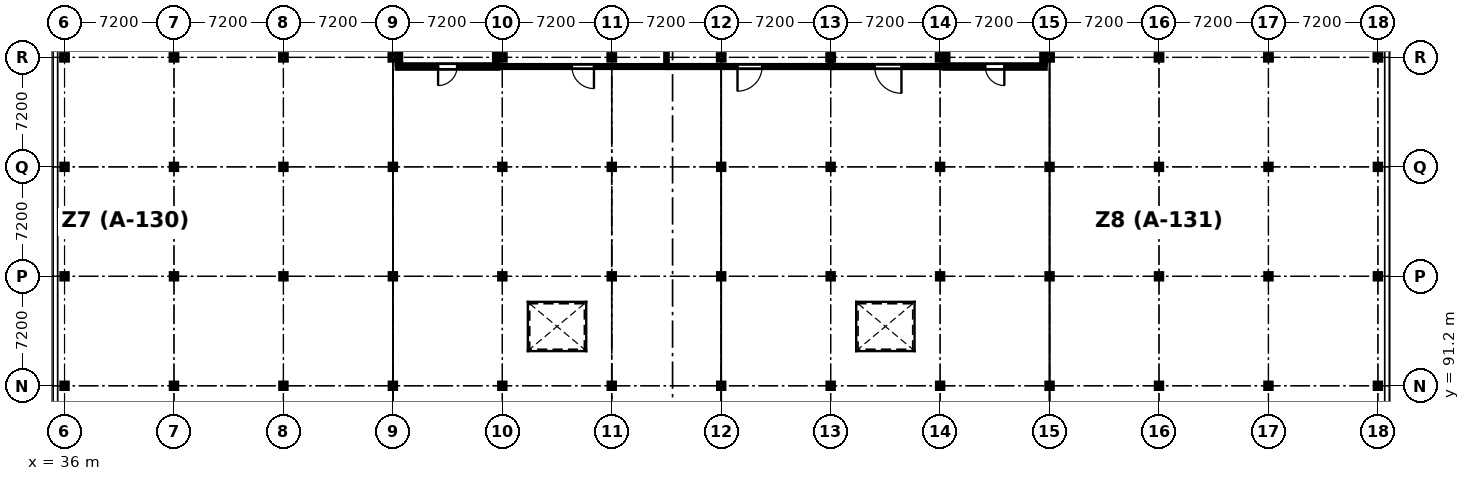
"""IFC4 building model, lengths in metres.
Left out: names, types, materials, properties, quantities, classifications, styles, units other than length and angle.
Written with IfcOpenShell. Run it as: python <this file> out.ifc"""

import sys

from ifc_helpers import new_model, si_unit, direction, frame, frame_2d, origin, origin_2d, place, context, subcontext, project, spatial, rectangle, i_section, extrude, element, fill, save


model = new_model("IFC4")
c1 = context("Model", 3, precision=1e-05, world=origin(), true_north=direction((0.0, 1.0)))
c2 = subcontext(c1, "Body", "Model", "MODEL_VIEW")
j1 = project(units=[si_unit("LENGTHUNIT", "METRE"), si_unit("PLANEANGLEUNIT", "RADIAN")], contexts=[c1])
p1 = place(None, origin())
s1 = spatial("IfcSite", under=j1, at=p1, CompositionType="ELEMENT")
p2 = place(p1, origin())
s2 = spatial("IfcBuilding", under=s1, at=p2, CompositionType="ELEMENT")
p3 = place(p2, frame((0.0, 0.0, 9.3)))
s3 = spatial("IfcBuildingStorey", under=s2, at=p3, CompositionType="ELEMENT", Elevation=9.3)
for number, where, z_axis, x_axis in (
    (1, (36.0, 91.2, 0.0), (0.0, 0.0, 1.0), (1.0, 0.0, 0.0)),
    (2, (36.0, 98.4, 0.0), (0.0, 0.0, 1.0), (1.0, 0.0, 0.0)),
    (3, (36.0, 105.6, 0.0), (0.0, 0.0, 1.0), (1.0, 0.0, 0.0)),
):
    element("IfcColumn", number, at=place(p3, frame(where, z_axis=z_axis, x_axis=x_axis)), inside=s3, PredefinedType="COLUMN", context=c2, shape_type="SweptSolid", body=[
        extrude(i_section(OverallWidth=0.373, OverallDepth=0.373, WebThickness=0.016, FlangeThickness=0.026, FilletRadius=0.015, at=origin_2d()), origin(), (0.0, 0.0, 1.0), 3.9),
    ])
p4 = place(p3, frame((36.0, 112.8, 0.0), z_axis=(0.0, 0.0, 1.0), x_axis=(1.0, 0.0, 0.0)))
e4 = element("IfcColumn", 4, at=p4, inside=s3, PredefinedType="COLUMN", context=c2, shape_type="SweptSolid", body=[
    extrude(i_section(OverallWidth=0.396, OverallDepth=0.381, WebThickness=0.019, FlangeThickness=0.03, FilletRadius=0.015, at=origin_2d()), origin(), (0.0, 0.0, 1.0), 3.9),
])
for number, where, z_axis, x_axis in (
    (5, (43.2, 91.2, 0.0), (0.0, 0.0, 1.0), (1.0, 0.0, 0.0)),
    (6, (43.2, 98.4, 0.0), (0.0, 0.0, 1.0), (1.0, 0.0, 0.0)),
    (7, (43.2, 105.6, 0.0), (0.0, 0.0, 1.0), (1.0, 0.0, 0.0)),
):
    element("IfcColumn", number, at=place(p3, frame(where, z_axis=z_axis, x_axis=x_axis)), inside=s3, PredefinedType="COLUMN", context=c2, shape_type="SweptSolid", body=[
        extrude(i_section(OverallWidth=0.373, OverallDepth=0.373, WebThickness=0.016, FlangeThickness=0.026, FilletRadius=0.015, at=origin_2d()), origin(), (0.0, 0.0, 1.0), 3.9),
    ])
p5 = place(p3, frame((43.2, 112.8, 0.0), z_axis=(0.0, 0.0, 1.0), x_axis=(1.0, 0.0, 0.0)))
e8 = element("IfcColumn", 8, at=p5, inside=s3, PredefinedType="COLUMN", context=c2, shape_type="SweptSolid", body=[
    extrude(i_section(OverallWidth=0.396, OverallDepth=0.381, WebThickness=0.019, FlangeThickness=0.03, FilletRadius=0.015, at=origin_2d()), origin(), (0.0, 0.0, 1.0), 3.9),
])
for number, where, z_axis, x_axis in (
    (9, (50.4, 91.2, 0.0), (0.0, 0.0, 1.0), (1.0, 0.0, 0.0)),
    (10, (50.4, 98.4, 0.0), (0.0, 0.0, 1.0), (1.0, 0.0, 0.0)),
    (11, (50.4, 105.6, 0.0), (0.0, 0.0, 1.0), (1.0, 0.0, 0.0)),
):
    element("IfcColumn", number, at=place(p3, frame(where, z_axis=z_axis, x_axis=x_axis)), inside=s3, PredefinedType="COLUMN", context=c2, shape_type="SweptSolid", body=[
        extrude(i_section(OverallWidth=0.373, OverallDepth=0.373, WebThickness=0.016, FlangeThickness=0.026, FilletRadius=0.015, at=origin_2d()), origin(), (0.0, 0.0, 1.0), 3.9),
    ])
p6 = place(p3, frame((50.4, 112.8, 0.0), z_axis=(0.0, 0.0, 1.0), x_axis=(1.0, 0.0, 0.0)))
e12 = element("IfcColumn", 12, at=p6, inside=s3, PredefinedType="COLUMN", context=c2, shape_type="SweptSolid", body=[
    extrude(i_section(OverallWidth=0.396, OverallDepth=0.381, WebThickness=0.019, FlangeThickness=0.03, FilletRadius=0.015, at=origin_2d()), origin(), (0.0, 0.0, 1.0), 3.9),
])
for number, where, z_axis, x_axis in (
    (13, (57.6, 91.2, 0.0), (0.0, 0.0, 1.0), (1.0, 0.0, 0.0)),
    (14, (57.6, 98.4, 0.0), (0.0, 0.0, 1.0), (1.0, 0.0, 0.0)),
    (15, (57.6, 105.6, 0.0), (0.0, 0.0, 1.0), (1.0, 0.0, 0.0)),
):
    element("IfcColumn", number, at=place(p3, frame(where, z_axis=z_axis, x_axis=x_axis)), inside=s3, PredefinedType="COLUMN", context=c2, shape_type="SweptSolid", body=[
        extrude(i_section(OverallWidth=0.373, OverallDepth=0.373, WebThickness=0.016, FlangeThickness=0.026, FilletRadius=0.015, at=origin_2d()), origin(), (0.0, 0.0, 1.0), 3.9),
    ])
p7 = place(p3, frame((57.6, 112.8, 0.0), z_axis=(0.0, 0.0, 1.0), x_axis=(1.0, 0.0, 0.0)))
e16 = element("IfcColumn", 16, at=p7, inside=s3, PredefinedType="COLUMN", context=c2, shape_type="SweptSolid", body=[
    extrude(i_section(OverallWidth=0.396, OverallDepth=0.381, WebThickness=0.019, FlangeThickness=0.03, FilletRadius=0.015, at=origin_2d()), origin(), (0.0, 0.0, 1.0), 3.9),
])
for number, where, z_axis, x_axis in (
    (17, (64.8, 91.2, 0.0), (0.0, 0.0, 1.0), (1.0, 0.0, 0.0)),
    (18, (64.8, 98.4, 0.0), (0.0, 0.0, 1.0), (1.0, 0.0, 0.0)),
    (19, (64.8, 105.6, 0.0), (0.0, 0.0, 1.0), (1.0, 0.0, 0.0)),
):
    element("IfcColumn", number, at=place(p3, frame(where, z_axis=z_axis, x_axis=x_axis)), inside=s3, PredefinedType="COLUMN", context=c2, shape_type="SweptSolid", body=[
        extrude(i_section(OverallWidth=0.373, OverallDepth=0.373, WebThickness=0.016, FlangeThickness=0.026, FilletRadius=0.015, at=origin_2d()), origin(), (0.0, 0.0, 1.0), 3.9),
    ])
p8 = place(p3, frame((64.8, 112.8, 0.0), z_axis=(0.0, 0.0, 1.0), x_axis=(1.0, 0.0, 0.0)))
e20 = element("IfcColumn", 20, at=p8, inside=s3, PredefinedType="COLUMN", context=c2, shape_type="SweptSolid", body=[
    extrude(i_section(OverallWidth=0.396, OverallDepth=0.381, WebThickness=0.019, FlangeThickness=0.03, FilletRadius=0.015, at=origin_2d()), origin(), (0.0, 0.0, 1.0), 3.9),
])
for number, where, z_axis, x_axis in (
    (21, (72.0, 91.2, 0.0), (0.0, 0.0, 1.0), (1.0, 0.0, 0.0)),
    (22, (72.0, 98.4, 0.0), (0.0, 0.0, 1.0), (1.0, 0.0, 0.0)),
    (23, (72.0, 105.6, 0.0), (0.0, 0.0, 1.0), (1.0, 0.0, 0.0)),
):
    element("IfcColumn", number, at=place(p3, frame(where, z_axis=z_axis, x_axis=x_axis)), inside=s3, PredefinedType="COLUMN", context=c2, shape_type="SweptSolid", body=[
        extrude(i_section(OverallWidth=0.373, OverallDepth=0.373, WebThickness=0.016, FlangeThickness=0.026, FilletRadius=0.015, at=origin_2d()), origin(), (0.0, 0.0, 1.0), 3.9),
    ])
p9 = place(p3, frame((72.0, 112.8, 0.0), z_axis=(0.0, 0.0, 1.0), x_axis=(1.0, 0.0, 0.0)))
e24 = element("IfcColumn", 24, at=p9, inside=s3, PredefinedType="COLUMN", context=c2, shape_type="SweptSolid", body=[
    extrude(i_section(OverallWidth=0.396, OverallDepth=0.381, WebThickness=0.019, FlangeThickness=0.03, FilletRadius=0.015, at=origin_2d()), origin(), (0.0, 0.0, 1.0), 3.9),
])
for number, where, z_axis, x_axis in (
    (25, (79.2, 91.2, 0.0), (0.0, 0.0, 1.0), (1.0, 0.0, 0.0)),
    (26, (79.2, 98.4, 0.0), (0.0, 0.0, 1.0), (1.0, 0.0, 0.0)),
    (27, (79.2, 105.6, 0.0), (0.0, 0.0, 1.0), (1.0, 0.0, 0.0)),
):
    element("IfcColumn", number, at=place(p3, frame(where, z_axis=z_axis, x_axis=x_axis)), inside=s3, PredefinedType="COLUMN", context=c2, shape_type="SweptSolid", body=[
        extrude(i_section(OverallWidth=0.373, OverallDepth=0.373, WebThickness=0.016, FlangeThickness=0.026, FilletRadius=0.015, at=origin_2d()), origin(), (0.0, 0.0, 1.0), 3.9),
    ])
p10 = place(p3, frame((79.2, 112.8, 0.0), z_axis=(0.0, 0.0, 1.0), x_axis=(1.0, 0.0, 0.0)))
e28 = element("IfcColumn", 28, at=p10, inside=s3, PredefinedType="COLUMN", context=c2, shape_type="SweptSolid", body=[
    extrude(i_section(OverallWidth=0.396, OverallDepth=0.381, WebThickness=0.019, FlangeThickness=0.03, FilletRadius=0.015, at=origin_2d()), origin(), (0.0, 0.0, 1.0), 3.9),
])
for number, where, z_axis, x_axis in (
    (29, (86.4, 91.2, 0.0), (0.0, 0.0, 1.0), (1.0, 0.0, 0.0)),
    (30, (86.4, 98.4, 0.0), (0.0, 0.0, 1.0), (1.0, 0.0, 0.0)),
    (31, (86.4, 105.6, 0.0), (0.0, 0.0, 1.0), (1.0, 0.0, 0.0)),
):
    element("IfcColumn", number, at=place(p3, frame(where, z_axis=z_axis, x_axis=x_axis)), inside=s3, PredefinedType="COLUMN", context=c2, shape_type="SweptSolid", body=[
        extrude(i_section(OverallWidth=0.373, OverallDepth=0.373, WebThickness=0.016, FlangeThickness=0.026, FilletRadius=0.015, at=origin_2d()), origin(), (0.0, 0.0, 1.0), 3.9),
    ])
p11 = place(p3, frame((86.4, 112.8, 0.0), z_axis=(0.0, 0.0, 1.0), x_axis=(1.0, 0.0, 0.0)))
e32 = element("IfcColumn", 32, at=p11, inside=s3, PredefinedType="COLUMN", context=c2, shape_type="SweptSolid", body=[
    extrude(i_section(OverallWidth=0.396, OverallDepth=0.381, WebThickness=0.019, FlangeThickness=0.03, FilletRadius=0.015, at=origin_2d()), origin(), (0.0, 0.0, 1.0), 3.9),
])
for number, where, z_axis, x_axis in (
    (33, (93.6, 91.2, 0.0), (0.0, 0.0, 1.0), (1.0, 0.0, 0.0)),
    (34, (93.6, 98.4, 0.0), (0.0, 0.0, 1.0), (1.0, 0.0, 0.0)),
    (35, (93.6, 105.6, 0.0), (0.0, 0.0, 1.0), (1.0, 0.0, 0.0)),
):
    element("IfcColumn", number, at=place(p3, frame(where, z_axis=z_axis, x_axis=x_axis)), inside=s3, PredefinedType="COLUMN", context=c2, shape_type="SweptSolid", body=[
        extrude(i_section(OverallWidth=0.373, OverallDepth=0.373, WebThickness=0.016, FlangeThickness=0.026, FilletRadius=0.015, at=origin_2d()), origin(), (0.0, 0.0, 1.0), 3.9),
    ])
p12 = place(p3, frame((93.6, 112.8, 0.0), z_axis=(0.0, 0.0, 1.0), x_axis=(1.0, 0.0, 0.0)))
e36 = element("IfcColumn", 36, at=p12, inside=s3, PredefinedType="COLUMN", context=c2, shape_type="SweptSolid", body=[
    extrude(i_section(OverallWidth=0.396, OverallDepth=0.381, WebThickness=0.019, FlangeThickness=0.03, FilletRadius=0.015, at=origin_2d()), origin(), (0.0, 0.0, 1.0), 3.9),
])
for number, where, z_axis, x_axis in (
    (37, (100.8, 91.2, 0.0), (0.0, 0.0, 1.0), (1.0, 0.0, 0.0)),
    (38, (100.8, 98.4, 0.0), (0.0, 0.0, 1.0), (1.0, 0.0, 0.0)),
    (39, (100.8, 105.6, 0.0), (0.0, 0.0, 1.0), (1.0, 0.0, 0.0)),
):
    element("IfcColumn", number, at=place(p3, frame(where, z_axis=z_axis, x_axis=x_axis)), inside=s3, PredefinedType="COLUMN", context=c2, shape_type="SweptSolid", body=[
        extrude(i_section(OverallWidth=0.373, OverallDepth=0.373, WebThickness=0.016, FlangeThickness=0.026, FilletRadius=0.015, at=origin_2d()), origin(), (0.0, 0.0, 1.0), 3.9),
    ])
p13 = place(p3, frame((100.8, 112.8, 0.0), z_axis=(0.0, 0.0, 1.0), x_axis=(1.0, 0.0, 0.0)))
e40 = element("IfcColumn", 40, at=p13, inside=s3, PredefinedType="COLUMN", context=c2, shape_type="SweptSolid", body=[
    extrude(i_section(OverallWidth=0.396, OverallDepth=0.381, WebThickness=0.019, FlangeThickness=0.03, FilletRadius=0.015, at=origin_2d()), origin(), (0.0, 0.0, 1.0), 3.9),
])
for number, where, z_axis, x_axis in (
    (41, (108.0, 91.2, 0.0), (0.0, 0.0, 1.0), (1.0, 0.0, 0.0)),
    (42, (108.0, 98.4, 0.0), (0.0, 0.0, 1.0), (1.0, 0.0, 0.0)),
    (43, (108.0, 105.6, 0.0), (0.0, 0.0, 1.0), (1.0, 0.0, 0.0)),
):
    element("IfcColumn", number, at=place(p3, frame(where, z_axis=z_axis, x_axis=x_axis)), inside=s3, PredefinedType="COLUMN", context=c2, shape_type="SweptSolid", body=[
        extrude(i_section(OverallWidth=0.373, OverallDepth=0.373, WebThickness=0.016, FlangeThickness=0.026, FilletRadius=0.015, at=origin_2d()), origin(), (0.0, 0.0, 1.0), 3.9),
    ])
p14 = place(p3, frame((108.0, 112.8, 0.0), z_axis=(0.0, 0.0, 1.0), x_axis=(1.0, 0.0, 0.0)))
e44 = element("IfcColumn", 44, at=p14, inside=s3, PredefinedType="COLUMN", context=c2, shape_type="SweptSolid", body=[
    extrude(i_section(OverallWidth=0.396, OverallDepth=0.381, WebThickness=0.019, FlangeThickness=0.03, FilletRadius=0.015, at=origin_2d()), origin(), (0.0, 0.0, 1.0), 3.9),
])
for number, where, z_axis, x_axis in (
    (45, (115.2, 91.2, 0.0), (0.0, 0.0, 1.0), (1.0, 0.0, 0.0)),
    (46, (115.2, 98.4, 0.0), (0.0, 0.0, 1.0), (1.0, 0.0, 0.0)),
    (47, (115.2, 105.6, 0.0), (0.0, 0.0, 1.0), (1.0, 0.0, 0.0)),
):
    element("IfcColumn", number, at=place(p3, frame(where, z_axis=z_axis, x_axis=x_axis)), inside=s3, PredefinedType="COLUMN", context=c2, shape_type="SweptSolid", body=[
        extrude(i_section(OverallWidth=0.373, OverallDepth=0.373, WebThickness=0.016, FlangeThickness=0.026, FilletRadius=0.015, at=origin_2d()), origin(), (0.0, 0.0, 1.0), 3.9),
    ])
p15 = place(p3, frame((115.2, 112.8, 0.0), z_axis=(0.0, 0.0, 1.0), x_axis=(1.0, 0.0, 0.0)))
e48 = element("IfcColumn", 48, at=p15, inside=s3, PredefinedType="COLUMN", context=c2, shape_type="SweptSolid", body=[
    extrude(i_section(OverallWidth=0.396, OverallDepth=0.381, WebThickness=0.019, FlangeThickness=0.03, FilletRadius=0.015, at=origin_2d()), origin(), (0.0, 0.0, 1.0), 3.9),
])
for number, where, z_axis, x_axis in (
    (49, (122.4, 91.2, 0.0), (0.0, 0.0, 1.0), (1.0, 0.0, 0.0)),
    (50, (122.4, 98.4, 0.0), (0.0, 0.0, 1.0), (1.0, 0.0, 0.0)),
    (51, (122.4, 105.6, 0.0), (0.0, 0.0, 1.0), (1.0, 0.0, 0.0)),
):
    element("IfcColumn", number, at=place(p3, frame(where, z_axis=z_axis, x_axis=x_axis)), inside=s3, PredefinedType="COLUMN", context=c2, shape_type="SweptSolid", body=[
        extrude(i_section(OverallWidth=0.373, OverallDepth=0.373, WebThickness=0.016, FlangeThickness=0.026, FilletRadius=0.015, at=origin_2d()), origin(), (0.0, 0.0, 1.0), 3.9),
    ])
p16 = place(p3, frame((122.4, 112.8, 0.0), z_axis=(0.0, 0.0, 1.0), x_axis=(1.0, 0.0, 0.0)))
e52 = element("IfcColumn", 52, at=p16, inside=s3, PredefinedType="COLUMN", context=c2, shape_type="SweptSolid", body=[
    extrude(i_section(OverallWidth=0.396, OverallDepth=0.381, WebThickness=0.019, FlangeThickness=0.03, FilletRadius=0.015, at=origin_2d()), origin(), (0.0, 0.0, 1.0), 3.9),
])
p17 = place(p3, frame((64.525, 112.2, 0.0), z_axis=(0.0, 0.0, 1.0), x_axis=(-1.0, 0.0, 0.0)))
e53 = element("IfcWall", 53, at=p17, inside=s3, PredefinedType="PARTITIONING", context=c2, shape_type="SweptSolid", body=[
    extrude(rectangle(XDim=6.65, YDim=0.25, at=frame_2d((3.325, 0.0))), origin(), (0.0, 0.0, 1.0), 3.058),
])
p18 = place(p17, frame((2.7, 0.0, 0.0)))
e54 = element("IfcOpeningElement", 54, at=p18, cuts=e53, PredefinedType="OPENING", context=c2, shape_type="SweptSolid", body=[
    extrude(rectangle(XDim=1.25, YDim=2.2, at=frame_2d((0.625, 1.1))), frame((0.0, 0.135, 0.0), z_axis=(0.0, -1.0, 0.0), x_axis=(1.0, 0.0, 0.0)), (0.0, 0.0, 1.0), 0.27),
])
for number, where, z_axis, x_axis in (
    (55, (58.0, 112.327, 0.0), (0.0, 0.0, 1.0), (0.0, 1.0, 0.0)),
    (56, (64.4, 115.998, 0.0), (0.0, 0.0, 1.0), (0.0, -1.0, 0.0)),
):
    element("IfcWall", number, at=place(p3, frame(where, z_axis=z_axis, x_axis=x_axis)), inside=s3, PredefinedType="PARTITIONING", context=c2, shape_type="SweptSolid", body=[
        extrude(rectangle(XDim=3.671, YDim=0.25, at=frame_2d((1.835, 0.0))), origin(), (0.0, 0.0, 1.0), 3.058),
    ])
p19 = place(p3, frame((100.525, 112.2, 0.0), z_axis=(0.0, 0.0, 1.0), x_axis=(-1.0, 0.0, 0.0)))
e57 = element("IfcWall", 57, at=p19, inside=s3, PredefinedType="PARTITIONING", context=c2, shape_type="SweptSolid", body=[
    extrude(rectangle(XDim=6.65, YDim=0.25, at=frame_2d((3.325, 0.0))), origin(), (0.0, 0.0, 1.0), 3.058),
])
p20 = place(p19, frame((2.7, 0.0, 0.0)))
e58 = element("IfcOpeningElement", 58, at=p20, cuts=e57, PredefinedType="OPENING", context=c2, shape_type="SweptSolid", body=[
    extrude(rectangle(XDim=1.25, YDim=2.2, at=frame_2d((0.625, 1.1))), frame((0.0, 0.135, 0.0), z_axis=(0.0, -1.0, 0.0), x_axis=(1.0, 0.0, 0.0)), (0.0, 0.0, 1.0), 0.27),
])
for number, where, z_axis, x_axis in (
    (59, (94.0, 112.327, 0.0), (0.0, 0.0, 1.0), (0.0, 1.0, 0.0)),
    (60, (100.4, 116.011, 0.0), (0.0, 0.0, 1.0), (0.0, -1.0, 0.0)),
):
    element("IfcWall", number, at=place(p3, frame(where, z_axis=z_axis, x_axis=x_axis)), inside=s3, PredefinedType="PARTITIONING", context=c2, shape_type="SweptSolid", body=[
        extrude(rectangle(XDim=3.684, YDim=0.25, at=frame_2d((1.842, 0.0))), origin(), (0.0, 0.0, 1.0), 3.058),
    ])
p21 = place(p3, frame((75.68, 112.2, 0.0), z_axis=(0.0, 0.0, 1.0), x_axis=(-1.0, 0.0, 0.0)))
e61 = element("IfcWall", 61, at=p21, inside=s3, PredefinedType="PARTITIONING", context=c2, shape_type="SweptSolid", body=[
    extrude(rectangle(XDim=11.153, YDim=0.155, at=frame_2d((5.576, 0.0))), origin(), (0.0, 0.0, 1.0), 3.058),
])
p22 = place(p21, frame((4.852, 0.0, 0.0)))
e62 = element("IfcOpeningElement", 62, at=p22, cuts=e61, PredefinedType="OPENING", context=c2, shape_type="SweptSolid", body=[
    extrude(rectangle(XDim=1.45, YDim=2.34, at=frame_2d((0.725, 1.17))), frame((0.0, 0.087, 0.0), z_axis=(0.0, -1.0, 0.0), x_axis=(1.0, 0.0, 0.0)), (0.0, 0.0, 1.0), 0.175),
])
p23 = place(p3, frame((86.48, 112.2, 0.0), z_axis=(0.0, 0.0, 1.0), x_axis=(-1.0, 0.0, 0.0)))
e63 = element("IfcWall", 63, at=p23, inside=s3, PredefinedType="PARTITIONING", context=c2, shape_type="SweptSolid", body=[
    extrude(rectangle(XDim=10.798, YDim=0.16, at=frame_2d((5.399, 0.0))), origin(), (0.0, 0.0, 1.0), 3.058),
])
p24 = place(p23, frame((4.589, 0.0, 0.0)))
e64 = element("IfcOpeningElement", 64, at=p24, cuts=e63, PredefinedType="OPENING", context=c2, shape_type="SweptSolid", body=[
    extrude(rectangle(XDim=1.62, YDim=2.34, at=frame_2d((0.81, 1.17))), frame((0.0, 0.09, 0.0), z_axis=(0.0, -1.0, 0.0), x_axis=(1.0, 0.0, 0.0)), (0.0, 0.0, 1.0), 0.18),
])
p25 = place(p23, frame((2.339, 0.0, 0.95)))
e65 = element("IfcOpeningElement", 65, at=p25, cuts=e63, PredefinedType="OPENING", context=c2, shape_type="SweptSolid", body=[
    extrude(rectangle(XDim=1.0, YDim=1.0, at=frame_2d((0.5, 0.5))), frame((0.0, 0.09, 0.0), z_axis=(0.0, -1.0, 0.0), x_axis=(1.0, 0.0, 0.0)), (0.0, 0.0, 1.0), 0.18),
])
p26 = place(p3, frame((93.873, 112.2, 0.0), z_axis=(0.0, 0.0, 1.0), x_axis=(-1.0, 0.0, 0.0)))
e66 = element("IfcWall", 66, at=p26, inside=s3, PredefinedType="PARTITIONING", context=c2, shape_type="SweptSolid", body=[
    extrude(rectangle(XDim=7.391, YDim=0.165, at=frame_2d((3.696, 0.0))), origin(), (0.0, 0.0, 1.0), 3.058),
])
p27 = place(p26, frame((2.816, 0.0, 0.0)))
e67 = element("IfcOpeningElement", 67, at=p27, cuts=e66, PredefinedType="OPENING", context=c2, shape_type="SweptSolid", body=[
    extrude(rectangle(XDim=1.76, YDim=2.34, at=frame_2d((0.88, 1.17))), frame((0.0, 0.093, 0.0), z_axis=(0.0, -1.0, 0.0), x_axis=(1.0, 0.0, 0.0)), (0.0, 0.0, 1.0), 0.185),
])
p28 = place(p3, frame((75.6, 116.034, 0.0), z_axis=(0.0, 0.0, 1.0), x_axis=(0.0, -1.0, 0.0)))
e68 = element("IfcWall", 68, at=p28, inside=s3, PredefinedType="PARTITIONING", context=c2, shape_type="SweptSolid", body=[
    extrude(rectangle(XDim=3.752, YDim=0.125, at=frame_2d((1.876, 0.0))), origin(), (0.0, 0.0, 1.0), 3.058),
])
p29 = place(p3, frame((86.4, 116.03, 0.0), z_axis=(0.0, 0.0, 1.0), x_axis=(0.0, -1.0, 0.0)))
e69 = element("IfcWall", 69, at=p29, inside=s3, PredefinedType="PARTITIONING", context=c2, shape_type="SweptSolid", body=[
    extrude(rectangle(XDim=3.745, YDim=0.13, at=frame_2d((1.873, 0.0))), origin(), (0.0, 0.0, 1.0), 3.058),
])
p30 = place(p18, origin())
e70 = element("IfcDoor", 70, at=p30, inside=s3, OperationType="SINGLE_SWING_RIGHT", PredefinedType="DOOR", context=c2, shape_type="SweptSolid", body=[
    extrude(rectangle(XDim=1.25, YDim=2.2, at=frame_2d((0.625, 1.1))), frame((0.0, 0.025, 0.0), z_axis=(0.0, -1.0, 0.0), x_axis=(1.0, 0.0, 0.0)), (0.0, 0.0, 1.0), 0.05),
])
fill(e54, e70)
p31 = place(p20, origin())
e71 = element("IfcDoor", 71, at=p31, inside=s3, OperationType="SINGLE_SWING_LEFT", PredefinedType="DOOR", context=c2, shape_type="SweptSolid", body=[
    extrude(rectangle(XDim=1.25, YDim=2.2, at=frame_2d((0.625, 1.1))), frame((0.0, 0.025, 0.0), z_axis=(0.0, -1.0, 0.0), x_axis=(1.0, 0.0, 0.0)), (0.0, 0.0, 1.0), 0.05),
])
fill(e58, e71)
p32 = place(p22, origin())
e72 = element("IfcDoor", 72, at=p32, inside=s3, OperationType="SINGLE_SWING_LEFT", PredefinedType="DOOR", context=c2, shape_type="SweptSolid", body=[
    extrude(rectangle(XDim=1.45, YDim=2.34, at=frame_2d((0.725, 1.17))), frame((0.0, 0.025, 0.0), z_axis=(0.0, -1.0, 0.0), x_axis=(1.0, 0.0, 0.0)), (0.0, 0.0, 1.0), 0.05),
])
fill(e62, e72)
p33 = place(p24, origin())
e73 = element("IfcDoor", 73, at=p33, inside=s3, OperationType="SINGLE_SWING_RIGHT", PredefinedType="DOOR", context=c2, shape_type="SweptSolid", body=[
    extrude(rectangle(XDim=1.62, YDim=2.34, at=frame_2d((0.81, 1.17))), frame((0.0, 0.025, 0.0), z_axis=(0.0, -1.0, 0.0), x_axis=(1.0, 0.0, 0.0)), (0.0, 0.0, 1.0), 0.05),
])
fill(e64, e73)
p34 = place(p25, origin())
e74 = element("IfcWindow", 74, at=p34, inside=s3, PartitioningType="SINGLE_PANEL", PredefinedType="WINDOW", context=c2, shape_type="SweptSolid", body=[
    extrude(rectangle(XDim=1.0, YDim=1.0, at=frame_2d((0.5, 0.5))), frame((0.0, 0.03, 0.0), z_axis=(0.0, -1.0, 0.0), x_axis=(1.0, 0.0, 0.0)), (0.0, 0.0, 1.0), 0.06),
])
fill(e65, e74)
p35 = place(p27, origin())
e75 = element("IfcDoor", 75, at=p35, inside=s3, OperationType="SINGLE_SWING_LEFT", PredefinedType="DOOR", context=c2, shape_type="SweptSolid", body=[
    extrude(rectangle(XDim=1.76, YDim=2.34, at=frame_2d((0.88, 1.17))), frame((0.0, 0.025, 0.0), z_axis=(0.0, -1.0, 0.0), x_axis=(1.0, 0.0, 0.0)), (0.0, 0.0, 1.0), 0.05),
])
fill(e67, e75)
save(model, sys.argv[1])
